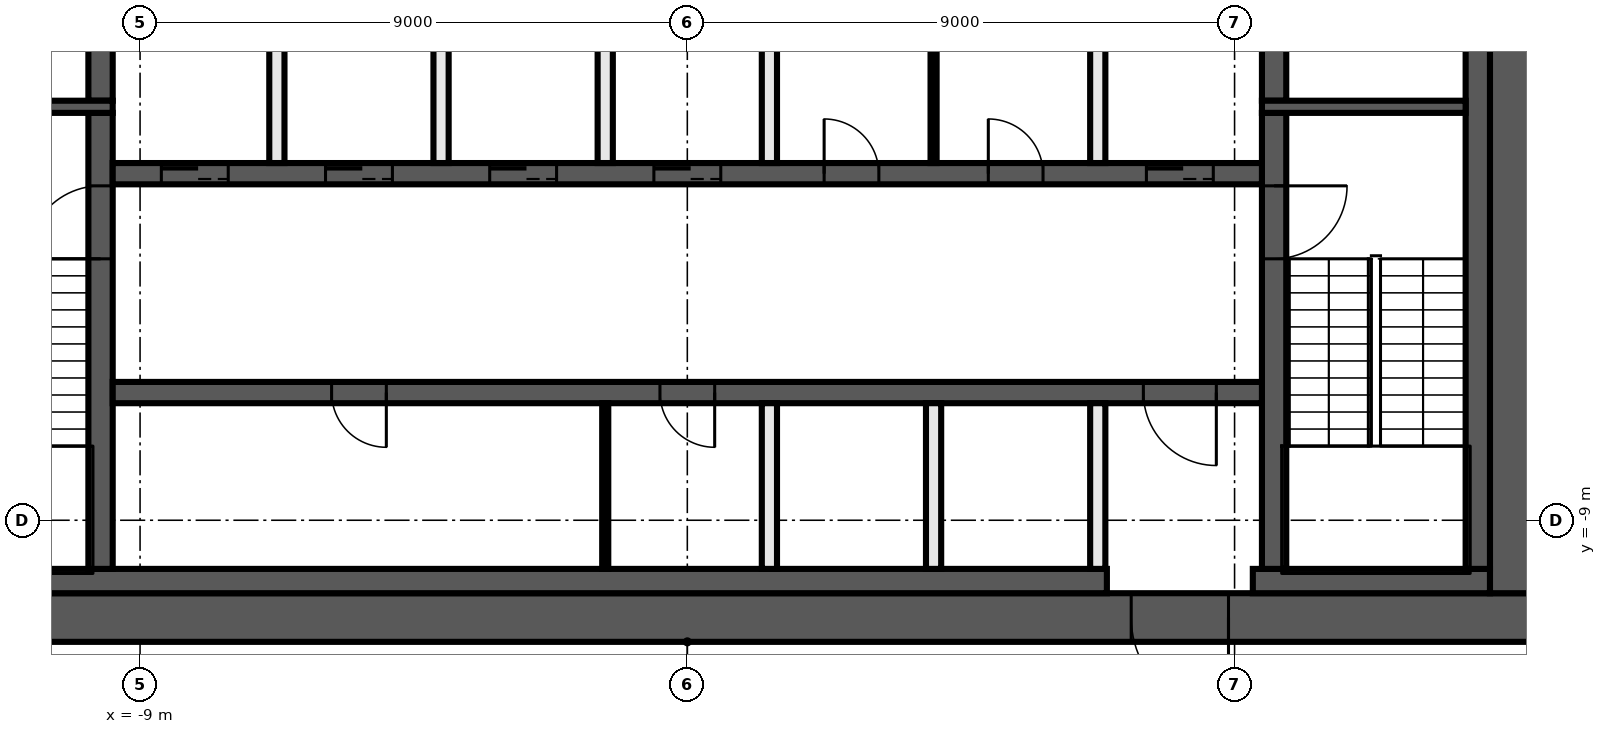
"""IFC4 building model, lengths in metres.
Left out: names, types, materials, properties, quantities, classifications, styles, units other than length and angle.
Written with IfcOpenShell. Run it as: python <this file> out.ifc"""

import sys

from ifc_helpers import new_model, si_unit, direction, frame, frame_2d, origin, place, context, subcontext, project, spatial, rectangle, extrude, element, fill, save


model = new_model("IFC4")
c1 = context("Model", 3, precision=1e-05, world=origin(), true_north=direction((0.0, 1.0)))
c2 = subcontext(c1, "Body", "Model", "MODEL_VIEW")
j1 = project(units=[si_unit("LENGTHUNIT", "METRE"), si_unit("PLANEANGLEUNIT", "RADIAN")], contexts=[c1])
p1 = place(None, origin())
s1 = spatial("IfcSite", under=j1, at=p1, CompositionType="ELEMENT")
p2 = place(p1, origin())
s2 = spatial("IfcBuilding", under=s1, at=p2, CompositionType="ELEMENT")
p3 = place(p2, frame((0.0, 0.0, 171.2)))
s3 = spatial("IfcBuildingStorey", under=s2, at=p3, CompositionType="ELEMENT", Elevation=171.2)
p4 = place(p3, frame((14.0, -10.6, 0.0), z_axis=(0.0, 0.0, 1.0), x_axis=(-1.0, 0.0, 0.0)))
e1 = element("IfcWall", 1, at=p4, inside=s3, PredefinedType="SHEAR", context=c2, shape_type="SweptSolid", body=[
    extrude(rectangle(XDim=28.0, YDim=0.8, at=frame_2d((14.0, 0.0))), origin(), (0.0, 0.0, 1.0), 3.82),
])
p5 = place(p4, frame((5.1, 0.0, 0.0)))
e2 = element("IfcOpeningElement", 2, at=p5, cuts=e1, PredefinedType="OPENING", context=c2, shape_type="SweptSolid", body=[
    extrude(rectangle(XDim=1.6, YDim=2.1, at=frame_2d((0.8, 1.05))), frame((0.0, 0.41, 0.0), z_axis=(0.0, -1.0, 0.0), x_axis=(1.0, 0.0, 0.0)), (0.0, 0.0, 1.0), 0.82),
])
p6 = place(p3, frame((13.6, 10.2, 0.0), z_axis=(0.0, 0.0, 1.0), x_axis=(0.0, -1.0, 0.0)))
e3 = element("IfcWall", 3, at=p6, inside=s3, PredefinedType="SHEAR", context=c2, shape_type="SweptSolid", body=[
    extrude(rectangle(XDim=20.4, YDim=0.8, at=frame_2d((10.2, 0.0))), origin(), (0.0, 0.0, 1.0), 3.82),
])
p7 = place(p3, frame((13.2, -10.0, 0.0), z_axis=(0.0, 0.0, 1.0), x_axis=(-1.0, 0.0, 0.0)))
e4 = element("IfcWall", 4, at=p7, inside=s3, PredefinedType="SHEAR", context=c2, shape_type="SweptSolid", body=[
    extrude(rectangle(XDim=3.9, YDim=0.4, at=frame_2d((1.95, 0.0))), origin(), (0.0, 0.0, 1.0), 3.82),
])
p8 = place(p3, frame((6.9, -10.0, 0.0), z_axis=(0.0, 0.0, 1.0), x_axis=(-1.0, 0.0, 0.0)))
e5 = element("IfcWall", 5, at=p8, inside=s3, PredefinedType="SHEAR", context=c2, shape_type="SweptSolid", body=[
    extrude(rectangle(XDim=20.1, YDim=0.4, at=frame_2d((10.05, 0.0))), origin(), (0.0, 0.0, 1.0), 3.82),
])
p9 = place(p3, frame((13.0, 9.8, 0.0), z_axis=(0.0, 0.0, 1.0), x_axis=(0.0, -1.0, 0.0)))
e6 = element("IfcWall", 6, at=p9, inside=s3, PredefinedType="SHEAR", context=c2, shape_type="SweptSolid", body=[
    extrude(rectangle(XDim=19.6, YDim=0.4, at=frame_2d((9.8, 0.0))), origin(), (0.0, 0.0, 1.0), 3.82),
])
p10 = place(p3, frame((9.65, -2.3, 0.0), z_axis=(0.0, 0.0, 1.0), x_axis=(0.0, -1.0, 0.0)))
e7 = element("IfcWall", 7, at=p10, inside=s3, PredefinedType="SHEAR", context=c2, shape_type="SweptSolid", body=[
    extrude(rectangle(XDim=7.5, YDim=0.4, at=frame_2d((3.75, 0.0))), origin(), (0.0, 0.0, 1.0), 3.82),
])
p11 = place(p10, frame((1.2, 0.0, 0.0)))
e8 = element("IfcOpeningElement", 8, at=p11, cuts=e7, PredefinedType="OPENING", context=c2, shape_type="SweptSolid", body=[
    extrude(rectangle(XDim=1.2, YDim=2.1, at=frame_2d((0.6, 1.05))), frame((0.0, 0.21, 0.0), z_axis=(0.0, -1.0, 0.0), x_axis=(1.0, 0.0, 0.0)), (0.0, 0.0, 1.0), 0.42),
])
p12 = place(p3, frame((9.65, 2.1, 0.0), z_axis=(0.0, 0.0, 1.0), x_axis=(0.0, -1.0, 0.0)))
e9 = element("IfcWall", 9, at=p12, inside=s3, PredefinedType="SHEAR", context=c2, shape_type="SweptSolid", body=[
    extrude(rectangle(XDim=4.2, YDim=0.4, at=frame_2d((2.1, 0.0))), origin(), (0.0, 0.0, 1.0), 3.82),
])
p13 = place(p12, frame((0.15, 0.0, 0.0)))
e10 = element("IfcOpeningElement", 10, at=p13, cuts=e9, PredefinedType="OPENING", context=c2, shape_type="SweptSolid", body=[
    extrude(rectangle(XDim=0.9, YDim=2.1, at=frame_2d((0.45, 1.05))), frame((0.0, 0.21, 0.0), z_axis=(0.0, -1.0, 0.0), x_axis=(1.0, 0.0, 0.0)), (0.0, 0.0, 1.0), 0.42),
])
p14 = place(p3, frame((-9.65, -9.8, 0.0), z_axis=(0.0, 0.0, 1.0), x_axis=(0.0, 1.0, 0.0)))
e11 = element("IfcWall", 11, at=p14, inside=s3, PredefinedType="SHEAR", context=c2, shape_type="SweptSolid", body=[
    extrude(rectangle(XDim=7.5, YDim=0.4, at=frame_2d((3.75, 0.0))), origin(), (0.0, 0.0, 1.0), 3.82),
])
p15 = place(p14, frame((5.1, 0.0, 0.0)))
e12 = element("IfcOpeningElement", 12, at=p15, cuts=e11, PredefinedType="OPENING", context=c2, shape_type="SweptSolid", body=[
    extrude(rectangle(XDim=1.2, YDim=2.1, at=frame_2d((0.6, 1.05))), frame((0.0, 0.21, 0.0), z_axis=(0.0, -1.0, 0.0), x_axis=(1.0, 0.0, 0.0)), (0.0, 0.0, 1.0), 0.42),
])
p16 = place(p3, frame((-9.65, -2.1, 0.0), z_axis=(0.0, 0.0, 1.0), x_axis=(0.0, 1.0, 0.0)))
e13 = element("IfcWall", 13, at=p16, inside=s3, PredefinedType="SHEAR", context=c2, shape_type="SweptSolid", body=[
    extrude(rectangle(XDim=4.2, YDim=0.4, at=frame_2d((2.1, 0.0))), origin(), (0.0, 0.0, 1.0), 3.82),
])
for number, where, z_axis, x_axis in (
    (14, (9.45, -2.2, 0.0), (0.0, 0.0, 1.0), (1.0, 0.0, 0.0)),
    (15, (-9.45, -2.2, 0.0), (0.0, 0.0, 1.0), (-1.0, 0.0, 0.0)),
):
    element("IfcWall", number, at=place(p3, frame(where, z_axis=z_axis, x_axis=x_axis)), inside=s3, PredefinedType="SHEAR", context=c2, shape_type="SweptSolid", body=[
        extrude(rectangle(XDim=3.35, YDim=0.2, at=frame_2d((1.675, 0.0))), origin(), (0.0, 0.0, 1.0), 3.82),
    ])
p17 = place(p3, frame((-9.45, -3.3, 0.0), z_axis=(0.0, 0.0, 1.0), x_axis=(1.0, 0.0, 0.0)))
e16 = element("IfcWall", 16, at=p17, inside=s3, PredefinedType="SHEAR", context=c2, shape_type="SweptSolid", body=[
    extrude(rectangle(XDim=18.9, YDim=0.35, at=frame_2d((9.45, 0.0))), origin(), (0.0, 0.0, 1.0), 3.82),
])
p18 = place(p17, frame((0.8, 0.0, 0.0)))
e17 = element("IfcOpeningElement", 17, at=p18, cuts=e16, PredefinedType="OPENING", context=c2, shape_type="SweptSolid", body=[
    extrude(rectangle(XDim=1.1, YDim=2.1, at=frame_2d((0.55, 1.05))), frame((0.0, 0.185, 0.0), z_axis=(0.0, -1.0, 0.0), x_axis=(1.0, 0.0, 0.0)), (0.0, 0.0, 1.0), 0.37),
])
p19 = place(p17, frame((3.5, 0.0, 0.0)))
e18 = element("IfcOpeningElement", 18, at=p19, cuts=e16, PredefinedType="OPENING", context=c2, shape_type="SweptSolid", body=[
    extrude(rectangle(XDim=1.1, YDim=2.1, at=frame_2d((0.55, 1.05))), frame((0.0, 0.185, 0.0), z_axis=(0.0, -1.0, 0.0), x_axis=(1.0, 0.0, 0.0)), (0.0, 0.0, 1.0), 0.37),
])
p20 = place(p17, frame((6.2, 0.0, 0.0)))
e19 = element("IfcOpeningElement", 19, at=p20, cuts=e16, PredefinedType="OPENING", context=c2, shape_type="SweptSolid", body=[
    extrude(rectangle(XDim=1.1, YDim=2.1, at=frame_2d((0.55, 1.05))), frame((0.0, 0.185, 0.0), z_axis=(0.0, -1.0, 0.0), x_axis=(1.0, 0.0, 0.0)), (0.0, 0.0, 1.0), 0.37),
])
p21 = place(p17, frame((8.9, 0.0, 0.0)))
e20 = element("IfcOpeningElement", 20, at=p21, cuts=e16, PredefinedType="OPENING", context=c2, shape_type="SweptSolid", body=[
    extrude(rectangle(XDim=1.1, YDim=2.1, at=frame_2d((0.55, 1.05))), frame((0.0, 0.185, 0.0), z_axis=(0.0, -1.0, 0.0), x_axis=(1.0, 0.0, 0.0)), (0.0, 0.0, 1.0), 0.37),
])
p22 = place(p17, frame((17.0, 0.0, 0.0)))
e21 = element("IfcOpeningElement", 21, at=p22, cuts=e16, PredefinedType="OPENING", context=c2, shape_type="SweptSolid", body=[
    extrude(rectangle(XDim=1.1, YDim=2.1, at=frame_2d((0.55, 1.05))), frame((0.0, 0.185, 0.0), z_axis=(0.0, -1.0, 0.0), x_axis=(1.0, 0.0, 0.0)), (0.0, 0.0, 1.0), 0.37),
])
p23 = place(p17, frame((11.7, 0.0, 0.0)))
e22 = element("IfcOpeningElement", 22, at=p23, cuts=e16, PredefinedType="OPENING", context=c2, shape_type="SweptSolid", body=[
    extrude(rectangle(XDim=0.9, YDim=2.1, at=frame_2d((0.45, 1.05))), frame((0.0, 0.185, 0.0), z_axis=(0.0, -1.0, 0.0), x_axis=(1.0, 0.0, 0.0)), (0.0, 0.0, 1.0), 0.37),
])
p24 = place(p17, frame((14.4, 0.0, 0.0)))
e23 = element("IfcOpeningElement", 23, at=p24, cuts=e16, PredefinedType="OPENING", context=c2, shape_type="SweptSolid", body=[
    extrude(rectangle(XDim=0.9, YDim=2.1, at=frame_2d((0.45, 1.05))), frame((0.0, 0.185, 0.0), z_axis=(0.0, -1.0, 0.0), x_axis=(1.0, 0.0, 0.0)), (0.0, 0.0, 1.0), 0.37),
])
p25 = place(p3, frame((9.45, -6.9, 0.0), z_axis=(0.0, 0.0, 1.0), x_axis=(-1.0, 0.0, 0.0)))
e24 = element("IfcWall", 24, at=p25, inside=s3, PredefinedType="SHEAR", context=c2, shape_type="SweptSolid", body=[
    extrude(rectangle(XDim=18.9, YDim=0.35, at=frame_2d((9.45, 0.0))), origin(), (0.0, 0.0, 1.0), 3.82),
])
p26 = place(p25, frame((0.75, 0.0, 0.0)))
e25 = element("IfcOpeningElement", 25, at=p26, cuts=e24, PredefinedType="OPENING", context=c2, shape_type="SweptSolid", body=[
    extrude(rectangle(XDim=1.2, YDim=2.1, at=frame_2d((0.6, 1.05))), frame((0.0, 0.185, 0.0), z_axis=(0.0, -1.0, 0.0), x_axis=(1.0, 0.0, 0.0)), (0.0, 0.0, 1.0), 0.37),
])
p27 = place(p25, frame((14.4, 0.0, 0.0)))
e26 = element("IfcOpeningElement", 26, at=p27, cuts=e24, PredefinedType="OPENING", context=c2, shape_type="SweptSolid", body=[
    extrude(rectangle(XDim=0.9, YDim=2.1, at=frame_2d((0.45, 1.05))), frame((0.0, 0.185, 0.0), z_axis=(0.0, -1.0, 0.0), x_axis=(1.0, 0.0, 0.0)), (0.0, 0.0, 1.0), 0.37),
])
p28 = place(p25, frame((9.0, 0.0, 0.0)))
e27 = element("IfcOpeningElement", 27, at=p28, cuts=e24, PredefinedType="OPENING", context=c2, shape_type="SweptSolid", body=[
    extrude(rectangle(XDim=0.9, YDim=2.1, at=frame_2d((0.45, 1.05))), frame((0.0, 0.185, 0.0), z_axis=(0.0, -1.0, 0.0), x_axis=(1.0, 0.0, 0.0)), (0.0, 0.0, 1.0), 0.37),
])
for number, where, z_axis, x_axis in (
    (28, (6.75, -9.8, 0.0), (0.0, 0.0, 1.0), (0.0, 1.0, 0.0)),
    (29, (6.75, -3.125, 0.0), (0.0, 0.0, 1.0), (0.0, 1.0, 0.0)),
):
    element("IfcWall", number, at=place(p3, frame(where, z_axis=z_axis, x_axis=x_axis)), inside=s3, PredefinedType="SOLIDWALL", context=c2, shape_type="SweptSolid", body=[
        extrude(rectangle(XDim=2.725, YDim=0.25, at=frame_2d((1.363, 0.0))), origin(), (0.0, 0.0, 1.0), 3.82),
    ])
p29 = place(p3, frame((4.05, -3.125, 0.0), z_axis=(0.0, 0.0, 1.0), x_axis=(0.0, 1.0, 0.0)))
e30 = element("IfcWall", 30, at=p29, inside=s3, PredefinedType="PARTITIONING", context=c2, shape_type="SweptSolid", body=[
    extrude(rectangle(XDim=2.725, YDim=0.1, at=frame_2d((1.363, 0.0))), origin(), (0.0, 0.0, 1.0), 3.82),
])
for number, where, z_axis, x_axis in (
    (31, (4.05, -9.8, 0.0), (0.0, 0.0, 1.0), (0.0, 1.0, 0.0)),
    (32, (1.35, -9.8, 0.0), (0.0, 0.0, 1.0), (0.0, 1.0, 0.0)),
    (33, (1.35, -3.125, 0.0), (0.0, 0.0, 1.0), (0.0, 1.0, 0.0)),
):
    element("IfcWall", number, at=place(p3, frame(where, z_axis=z_axis, x_axis=x_axis)), inside=s3, PredefinedType="SOLIDWALL", context=c2, shape_type="SweptSolid", body=[
        extrude(rectangle(XDim=2.725, YDim=0.25, at=frame_2d((1.363, 0.0))), origin(), (0.0, 0.0, 1.0), 3.82),
    ])
p30 = place(p3, frame((-1.35, -9.8, 0.0), z_axis=(0.0, 0.0, 1.0), x_axis=(0.0, 1.0, 0.0)))
e34 = element("IfcWall", 34, at=p30, inside=s3, PredefinedType="PARTITIONING", context=c2, shape_type="SweptSolid", body=[
    extrude(rectangle(XDim=2.725, YDim=0.1, at=frame_2d((1.363, 0.0))), origin(), (0.0, 0.0, 1.0), 3.82),
])
for number, where, z_axis, x_axis in (
    (35, (-1.35, -3.125, 0.0), (0.0, 0.0, 1.0), (0.0, 1.0, 0.0)),
    (36, (-4.05, -3.125, 0.0), (0.0, 0.0, 1.0), (0.0, 1.0, 0.0)),
    (37, (-6.75, -3.125, 0.0), (0.0, 0.0, 1.0), (0.0, 1.0, 0.0)),
):
    element("IfcWall", number, at=place(p3, frame(where, z_axis=z_axis, x_axis=x_axis)), inside=s3, PredefinedType="SOLIDWALL", context=c2, shape_type="SweptSolid", body=[
        extrude(rectangle(XDim=2.725, YDim=0.25, at=frame_2d((1.363, 0.0))), origin(), (0.0, 0.0, 1.0), 3.82),
    ])
p31 = place(p18, origin())
e38 = element("IfcDoor", 38, at=p31, inside=s3, OperationType="DOUBLE_DOOR_SLIDING", PredefinedType="DOOR", context=c2, shape_type="SweptSolid", body=[
    extrude(rectangle(XDim=1.1, YDim=2.1, at=frame_2d((0.55, 1.05))), frame((0.0, 0.025, 0.0), z_axis=(0.0, -1.0, 0.0), x_axis=(1.0, 0.0, 0.0)), (0.0, 0.0, 1.0), 0.05),
])
fill(e17, e38)
p32 = place(p19, origin())
e39 = element("IfcDoor", 39, at=p32, inside=s3, OperationType="DOUBLE_DOOR_SLIDING", PredefinedType="DOOR", context=c2, shape_type="SweptSolid", body=[
    extrude(rectangle(XDim=1.1, YDim=2.1, at=frame_2d((0.55, 1.05))), frame((0.0, 0.025, 0.0), z_axis=(0.0, -1.0, 0.0), x_axis=(1.0, 0.0, 0.0)), (0.0, 0.0, 1.0), 0.05),
])
fill(e18, e39)
p33 = place(p20, origin())
e40 = element("IfcDoor", 40, at=p33, inside=s3, OperationType="DOUBLE_DOOR_SLIDING", PredefinedType="DOOR", context=c2, shape_type="SweptSolid", body=[
    extrude(rectangle(XDim=1.1, YDim=2.1, at=frame_2d((0.55, 1.05))), frame((0.0, 0.025, 0.0), z_axis=(0.0, -1.0, 0.0), x_axis=(1.0, 0.0, 0.0)), (0.0, 0.0, 1.0), 0.05),
])
fill(e19, e40)
p34 = place(p21, origin())
e41 = element("IfcDoor", 41, at=p34, inside=s3, OperationType="DOUBLE_DOOR_SLIDING", PredefinedType="DOOR", context=c2, shape_type="SweptSolid", body=[
    extrude(rectangle(XDim=1.1, YDim=2.1, at=frame_2d((0.55, 1.05))), frame((0.0, 0.025, 0.0), z_axis=(0.0, -1.0, 0.0), x_axis=(1.0, 0.0, 0.0)), (0.0, 0.0, 1.0), 0.05),
])
fill(e20, e41)
p35 = place(p22, origin())
e42 = element("IfcDoor", 42, at=p35, inside=s3, OperationType="DOUBLE_DOOR_SLIDING", PredefinedType="DOOR", context=c2, shape_type="SweptSolid", body=[
    extrude(rectangle(XDim=1.1, YDim=2.1, at=frame_2d((0.55, 1.05))), frame((0.0, 0.025, 0.0), z_axis=(0.0, -1.0, 0.0), x_axis=(1.0, 0.0, 0.0)), (0.0, 0.0, 1.0), 0.05),
])
fill(e21, e42)
p36 = place(p5, origin())
e43 = element("IfcDoor", 43, at=p36, inside=s3, OperationType="DOUBLE_DOOR_SINGLE_SWING", PredefinedType="DOOR", context=c2, shape_type="SweptSolid", body=[
    extrude(rectangle(XDim=1.6, YDim=2.1, at=frame_2d((0.8, 1.05))), frame((0.0, 0.025, 0.0), z_axis=(0.0, -1.0, 0.0), x_axis=(1.0, 0.0, 0.0)), (0.0, 0.0, 1.0), 0.05),
])
fill(e2, e43)
p37 = place(p26, origin())
e44 = element("IfcDoor", 44, at=p37, inside=s3, OperationType="SINGLE_SWING_LEFT", PredefinedType="DOOR", context=c2, shape_type="SweptSolid", body=[
    extrude(rectangle(XDim=1.2, YDim=2.1, at=frame_2d((0.6, 1.05))), frame((0.0, 0.025, 0.0), z_axis=(0.0, -1.0, 0.0), x_axis=(1.0, 0.0, 0.0)), (0.0, 0.0, 1.0), 0.05),
])
fill(e25, e44)
p38 = place(p23, origin())
e45 = element("IfcDoor", 45, at=p38, inside=s3, OperationType="SINGLE_SWING_RIGHT", PredefinedType="DOOR", context=c2, shape_type="SweptSolid", body=[
    extrude(rectangle(XDim=0.9, YDim=2.1, at=frame_2d((0.45, 1.05))), frame((0.0, 0.025, 0.0), z_axis=(0.0, -1.0, 0.0), x_axis=(1.0, 0.0, 0.0)), (0.0, 0.0, 1.0), 0.05),
])
fill(e22, e45)
p39 = place(p24, origin())
e46 = element("IfcDoor", 46, at=p39, inside=s3, OperationType="SINGLE_SWING_LEFT", PredefinedType="DOOR", context=c2, shape_type="SweptSolid", body=[
    extrude(rectangle(XDim=0.9, YDim=2.1, at=frame_2d((0.45, 1.05))), frame((0.0, 0.025, 0.0), z_axis=(0.0, -1.0, 0.0), x_axis=(1.0, 0.0, 0.0)), (0.0, 0.0, 1.0), 0.05),
])
fill(e23, e46)
p40 = place(p27, origin())
e47 = element("IfcDoor", 47, at=p40, inside=s3, OperationType="SINGLE_SWING_RIGHT", PredefinedType="DOOR", context=c2, shape_type="SweptSolid", body=[
    extrude(rectangle(XDim=0.9, YDim=2.1, at=frame_2d((0.45, 1.05))), frame((0.0, 0.025, 0.0), z_axis=(0.0, -1.0, 0.0), x_axis=(1.0, 0.0, 0.0)), (0.0, 0.0, 1.0), 0.05),
])
fill(e26, e47)
p41 = place(p28, origin())
e48 = element("IfcDoor", 48, at=p41, inside=s3, OperationType="SINGLE_SWING_LEFT", PredefinedType="DOOR", context=c2, shape_type="SweptSolid", body=[
    extrude(rectangle(XDim=0.9, YDim=2.1, at=frame_2d((0.45, 1.05))), frame((0.0, 0.025, 0.0), z_axis=(0.0, -1.0, 0.0), x_axis=(1.0, 0.0, 0.0)), (0.0, 0.0, 1.0), 0.05),
])
fill(e27, e48)
p42 = place(p11, origin())
e49 = element("IfcDoor", 49, at=p42, inside=s3, OperationType="SINGLE_SWING_RIGHT", PredefinedType="DOOR", context=c2, shape_type="SweptSolid", body=[
    extrude(rectangle(XDim=1.2, YDim=2.1, at=frame_2d((0.6, 1.05))), frame((0.0, 0.025, 0.0), z_axis=(0.0, -1.0, 0.0), x_axis=(1.0, 0.0, 0.0)), (0.0, 0.0, 1.0), 0.05),
])
fill(e8, e49)
p43 = place(p15, origin())
e50 = element("IfcDoor", 50, at=p43, inside=s3, OperationType="SINGLE_SWING_LEFT", PredefinedType="DOOR", context=c2, shape_type="SweptSolid", body=[
    extrude(rectangle(XDim=1.2, YDim=2.1, at=frame_2d((0.6, 1.05))), frame((0.0, 0.025, 0.0), z_axis=(0.0, -1.0, 0.0), x_axis=(1.0, 0.0, 0.0)), (0.0, 0.0, 1.0), 0.05),
])
fill(e12, e50)
save(model, sys.argv[1])
